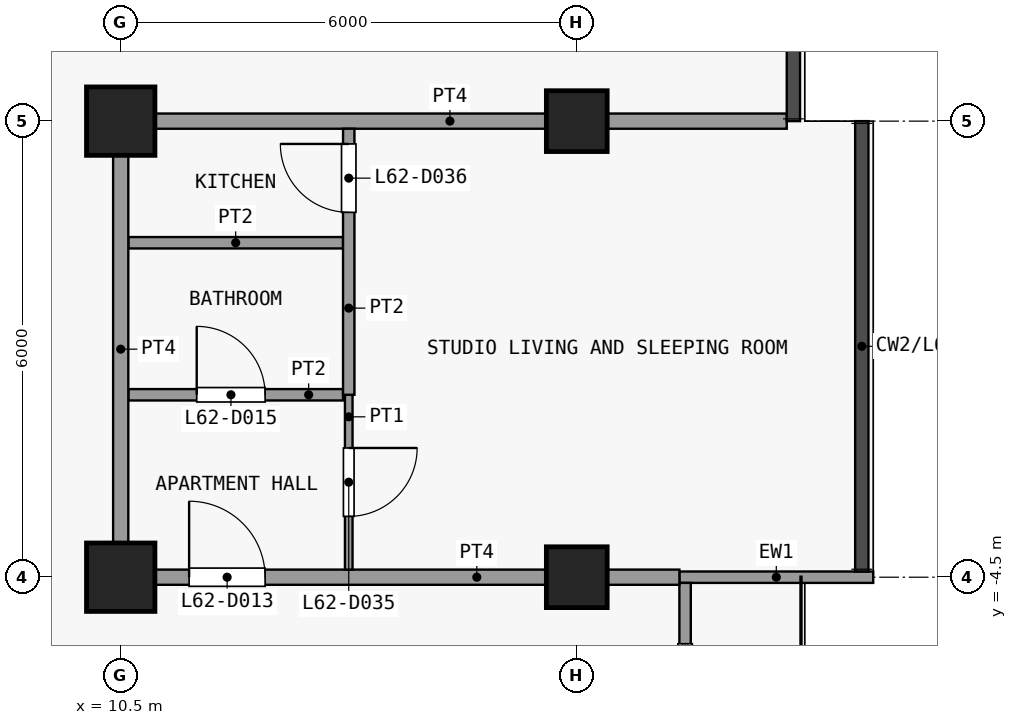
"""IFC4 building model, lengths in metres.
Left out: names, types, materials, properties, quantities, classifications, styles, units other than length and angle.
Written with IfcOpenShell. Run it as: python <this file> out.ifc"""

import sys

from ifc_helpers import new_model, si_unit, direction, frame, frame_2d, origin, origin_2d, place, context, subcontext, project, spatial, rectangle, extrude, element, fill, save


model = new_model("IFC4")
c1 = context("Model", 3, precision=1e-05, world=origin(), true_north=direction((0.0, 1.0)))
c2 = subcontext(c1, "Body", "Model", "MODEL_VIEW")
j1 = project(units=[si_unit("LENGTHUNIT", "METRE"), si_unit("PLANEANGLEUNIT", "RADIAN")], contexts=[c1])
p1 = place(None, origin())
s1 = spatial("IfcSite", under=j1, at=p1, CompositionType="ELEMENT")
p2 = place(p1, origin())
s2 = spatial("IfcBuilding", under=s1, at=p2, CompositionType="ELEMENT")
p3 = place(p2, frame((0.0, 0.0, 244.7)))
s3 = spatial("IfcBuildingStorey", under=s2, at=p3, CompositionType="ELEMENT", Elevation=244.7)
for number, where, z_axis, x_axis in (
    (1, (10.5, -4.5, 0.0), (0.0, 0.0, 1.0), (1.0, 0.0, 0.0)),
    (2, (10.5, 1.5, 0.0), (0.0, 0.0, 1.0), (1.0, 0.0, 0.0)),
):
    element("IfcColumn", number, at=place(p3, frame(where, z_axis=z_axis, x_axis=x_axis)), inside=s3, PredefinedType="COLUMN", context=c2, shape_type="SweptSolid", body=[
        extrude(rectangle(XDim=0.9, YDim=0.9, at=origin_2d()), origin(), (0.0, 0.0, 1.0), 3.6),
    ])
for number, where, z_axis, x_axis in (
    (3, (16.5, -4.5, 0.0), (0.0, 0.0, 1.0), (1.0, 0.0, 0.0)),
    (4, (16.5, 1.5, 0.0), (0.0, 0.0, 1.0), (1.0, 0.0, 0.0)),
):
    element("IfcColumn", number, at=place(p3, frame(where, z_axis=z_axis, x_axis=x_axis)), inside=s3, PredefinedType="COLUMN", context=c2, shape_type="SweptSolid", body=[
        extrude(rectangle(XDim=0.8, YDim=0.8, at=origin_2d()), origin(), (0.0, 0.0, 1.0), 3.6),
    ])
p4 = place(p3, frame((17.85, -4.5, 0.0), z_axis=(0.0, 0.0, 1.0), x_axis=(1.0, 0.0, 0.0)))
e5 = element("IfcWall", 5, at=p4, inside=s3, PredefinedType="SOLIDWALL", context=c2, shape_type="SweptSolid", body=[
    extrude(rectangle(XDim=2.55, YDim=0.15, at=frame_2d((1.275, 0.0))), origin(), (0.0, 0.0, 1.0), 3.15),
])
p5 = place(p3, frame((17.925, -4.575, 0.0), z_axis=(0.0, 0.0, 1.0), x_axis=(0.0, -1.0, 0.0)))
e6 = element("IfcWall", 6, at=p5, inside=s3, PredefinedType="SOLIDWALL", context=c2, shape_type="SweptSolid", body=[
    extrude(rectangle(XDim=8.85, YDim=0.15, at=frame_2d((4.425, 0.0))), origin(), (0.0, 0.0, 1.0), 3.15),
])
p6 = place(p5, frame((4.6, 0.0, 0.0)))
e7 = element("IfcOpeningElement", 7, at=p6, cuts=e6, PredefinedType="OPENING", context=c2, shape_type="SweptSolid", body=[
    extrude(rectangle(XDim=1.2, YDim=2.4, at=frame_2d((0.6, 1.2))), frame((0.0, 0.085, 0.0), z_axis=(0.0, -1.0, 0.0), x_axis=(1.0, 0.0, 0.0)), (0.0, 0.0, 1.0), 0.17),
])
p7 = place(p5, frame((6.55, 0.0, 0.9)))
e8 = element("IfcOpeningElement", 8, at=p7, cuts=e6, PredefinedType="OPENING", context=c2, shape_type="SweptSolid", body=[
    extrude(rectangle(XDim=2.05, YDim=2.1, at=frame_2d((1.025, 1.05))), frame((0.0, 0.085, 0.0), z_axis=(0.0, -1.0, 0.0), x_axis=(1.0, 0.0, 0.0)), (0.0, 0.0, 1.0), 0.17),
])
p8 = place(p5, frame((0.8, 0.0, 0.9)))
e9 = element("IfcOpeningElement", 9, at=p8, cuts=e6, PredefinedType="OPENING", context=c2, shape_type="SweptSolid", body=[
    extrude(rectangle(XDim=2.275, YDim=2.1, at=frame_2d((1.137, 1.05))), frame((0.0, 0.085, 0.0), z_axis=(0.0, -1.0, 0.0), x_axis=(1.0, 0.0, 0.0)), (0.0, 0.0, 1.0), 0.17),
])
p9 = place(p3, frame((10.4, -4.5, 0.0), z_axis=(0.0, 0.0, 1.0), x_axis=(1.0, 0.0, 0.0)))
e10 = element("IfcWall", 10, at=p9, inside=s3, PredefinedType="PARTITIONING", context=c2, shape_type="SweptSolid", body=[
    extrude(rectangle(XDim=7.45, YDim=0.2, at=frame_2d((3.725, 0.0))), origin(), (0.0, 0.0, 1.0), 3.15),
])
p10 = place(p9, frame((1.0, 0.0, 0.0)))
e11 = element("IfcOpeningElement", 11, at=p10, cuts=e10, PredefinedType="OPENING", context=c2, shape_type="SweptSolid", body=[
    extrude(rectangle(XDim=1.0, YDim=2.1, at=frame_2d((0.5, 1.05))), frame((0.0, 0.11, 0.0), z_axis=(0.0, -1.0, 0.0), x_axis=(1.0, 0.0, 0.0)), (0.0, 0.0, 1.0), 0.22),
])
p11 = place(p3, frame((10.6, -2.1, 0.0), z_axis=(0.0, 0.0, 1.0), x_axis=(1.0, 0.0, 0.0)))
e12 = element("IfcWall", 12, at=p11, inside=s3, PredefinedType="PARTITIONING", context=c2, shape_type="SweptSolid", body=[
    extrude(rectangle(XDim=2.825, YDim=0.15, at=frame_2d((1.413, 0.0))), origin(), (0.0, 0.0, 1.0), 3.15),
])
p12 = place(p11, frame((0.9, 0.0, 0.0)))
e13 = element("IfcOpeningElement", 13, at=p12, cuts=e12, PredefinedType="OPENING", context=c2, shape_type="SweptSolid", body=[
    extrude(rectangle(XDim=0.9, YDim=2.1, at=frame_2d((0.45, 1.05))), frame((0.0, 0.085, 0.0), z_axis=(0.0, -1.0, 0.0), x_axis=(1.0, 0.0, 0.0)), (0.0, 0.0, 1.0), 0.17),
])
p13 = place(p3, frame((10.6, -0.1, 0.0), z_axis=(0.0, 0.0, 1.0), x_axis=(1.0, 0.0, 0.0)))
e14 = element("IfcWall", 14, at=p13, inside=s3, PredefinedType="PARTITIONING", context=c2, shape_type="SweptSolid", body=[
    extrude(rectangle(XDim=2.825, YDim=0.15, at=frame_2d((1.413, 0.0))), origin(), (0.0, 0.0, 1.0), 3.15),
])
p14 = place(p3, frame((10.4, 1.5, 0.0), z_axis=(0.0, 0.0, 1.0), x_axis=(1.0, 0.0, 0.0)))
e15 = element("IfcWall", 15, at=p14, inside=s3, PredefinedType="PARTITIONING", context=c2, shape_type="SweptSolid", body=[
    extrude(rectangle(XDim=8.863, YDim=0.2, at=frame_2d((4.431, 0.0))), origin(), (0.0, 0.0, 1.0), 3.15),
])
p15 = place(p3, frame((10.5, -4.4, 0.0), z_axis=(0.0, 0.0, 1.0), x_axis=(0.0, 1.0, 0.0)))
e16 = element("IfcWall", 16, at=p15, inside=s3, PredefinedType="PARTITIONING", context=c2, shape_type="SweptSolid", body=[
    extrude(rectangle(XDim=5.8, YDim=0.2, at=frame_2d((2.9, 0.0))), origin(), (0.0, 0.0, 1.0), 3.15),
])
p16 = place(p3, frame((13.5, -4.4, 0.0), z_axis=(0.0, 0.0, 1.0), x_axis=(0.0, 1.0, 0.0)))
e17 = element("IfcWall", 17, at=p16, inside=s3, PredefinedType="PARTITIONING", context=c2, shape_type="SweptSolid", body=[
    extrude(rectangle(XDim=2.3, YDim=0.1, at=frame_2d((1.15, 0.0))), origin(), (0.0, 0.0, 1.0), 3.15),
])
p17 = place(p16, frame((0.7, 0.0, 0.0)))
e18 = element("IfcOpeningElement", 18, at=p17, cuts=e17, PredefinedType="OPENING", context=c2, shape_type="SweptSolid", body=[
    extrude(rectangle(XDim=0.9, YDim=2.1, at=frame_2d((0.45, 1.05))), frame((0.0, 0.06, 0.0), z_axis=(0.0, -1.0, 0.0), x_axis=(1.0, 0.0, 0.0)), (0.0, 0.0, 1.0), 0.12),
])
p18 = place(p3, frame((13.5, -2.1, 0.0), z_axis=(0.0, 0.0, 1.0), x_axis=(0.0, 1.0, 0.0)))
e19 = element("IfcWall", 19, at=p18, inside=s3, PredefinedType="PARTITIONING", context=c2, shape_type="SweptSolid", body=[
    extrude(rectangle(XDim=3.5, YDim=0.15, at=frame_2d((1.75, 0.0))), origin(), (0.0, 0.0, 1.0), 3.15),
])
p19 = place(p18, frame((2.4, 0.0, 0.0)))
e20 = element("IfcOpeningElement", 20, at=p19, cuts=e19, PredefinedType="OPENING", context=c2, shape_type="SweptSolid", body=[
    extrude(rectangle(XDim=0.9, YDim=2.1, at=frame_2d((0.45, 1.05))), frame((0.0, 0.085, 0.0), z_axis=(0.0, -1.0, 0.0), x_axis=(1.0, 0.0, 0.0)), (0.0, 0.0, 1.0), 0.17),
])
p20 = place(p8, origin())
e21 = element("IfcWindow", 21, at=p20, inside=s3, PartitioningType="SINGLE_PANEL", PredefinedType="WINDOW", context=c2, shape_type="SweptSolid", body=[
    extrude(rectangle(XDim=2.275, YDim=2.1, at=frame_2d((1.137, 1.05))), frame((0.0, 0.03, 0.0), z_axis=(0.0, -1.0, 0.0), x_axis=(1.0, 0.0, 0.0)), (0.0, 0.0, 1.0), 0.06),
])
fill(e9, e21)
p21 = place(p10, origin())
e22 = element("IfcDoor", 22, at=p21, inside=s3, OperationType="SINGLE_SWING_RIGHT", PredefinedType="DOOR", context=c2, shape_type="SweptSolid", body=[
    extrude(rectangle(XDim=1.0, YDim=2.1, at=frame_2d((0.5, 1.05))), frame((0.0, 0.025, 0.0), z_axis=(0.0, -1.0, 0.0), x_axis=(1.0, 0.0, 0.0)), (0.0, 0.0, 1.0), 0.05),
])
fill(e11, e22)
p22 = place(p12, origin())
e23 = element("IfcDoor", 23, at=p22, inside=s3, OperationType="SINGLE_SWING_RIGHT", PredefinedType="DOOR", context=c2, shape_type="SweptSolid", body=[
    extrude(rectangle(XDim=0.9, YDim=2.1, at=frame_2d((0.45, 1.05))), frame((0.0, 0.025, 0.0), z_axis=(0.0, -1.0, 0.0), x_axis=(1.0, 0.0, 0.0)), (0.0, 0.0, 1.0), 0.05),
])
fill(e13, e23)
p23 = place(p17, origin())
e24 = element("IfcDoor", 24, at=p23, inside=s3, OperationType="SINGLE_SWING_RIGHT", PredefinedType="DOOR", context=c2, shape_type="SweptSolid", body=[
    extrude(rectangle(XDim=0.9, YDim=2.1, at=frame_2d((0.45, 1.05))), frame((0.0, 0.025, 0.0), z_axis=(0.0, -1.0, 0.0), x_axis=(1.0, 0.0, 0.0)), (0.0, 0.0, 1.0), 0.05),
])
fill(e18, e24)
p24 = place(p19, origin())
e25 = element("IfcDoor", 25, at=p24, inside=s3, OperationType="SINGLE_SWING_LEFT", PredefinedType="DOOR", context=c2, shape_type="SweptSolid", body=[
    extrude(rectangle(XDim=0.9, YDim=2.1, at=frame_2d((0.45, 1.05))), frame((0.0, 0.025, 0.0), z_axis=(0.0, -1.0, 0.0), x_axis=(1.0, 0.0, 0.0)), (0.0, 0.0, 1.0), 0.05),
])
fill(e20, e25)
save(model, sys.argv[1])
